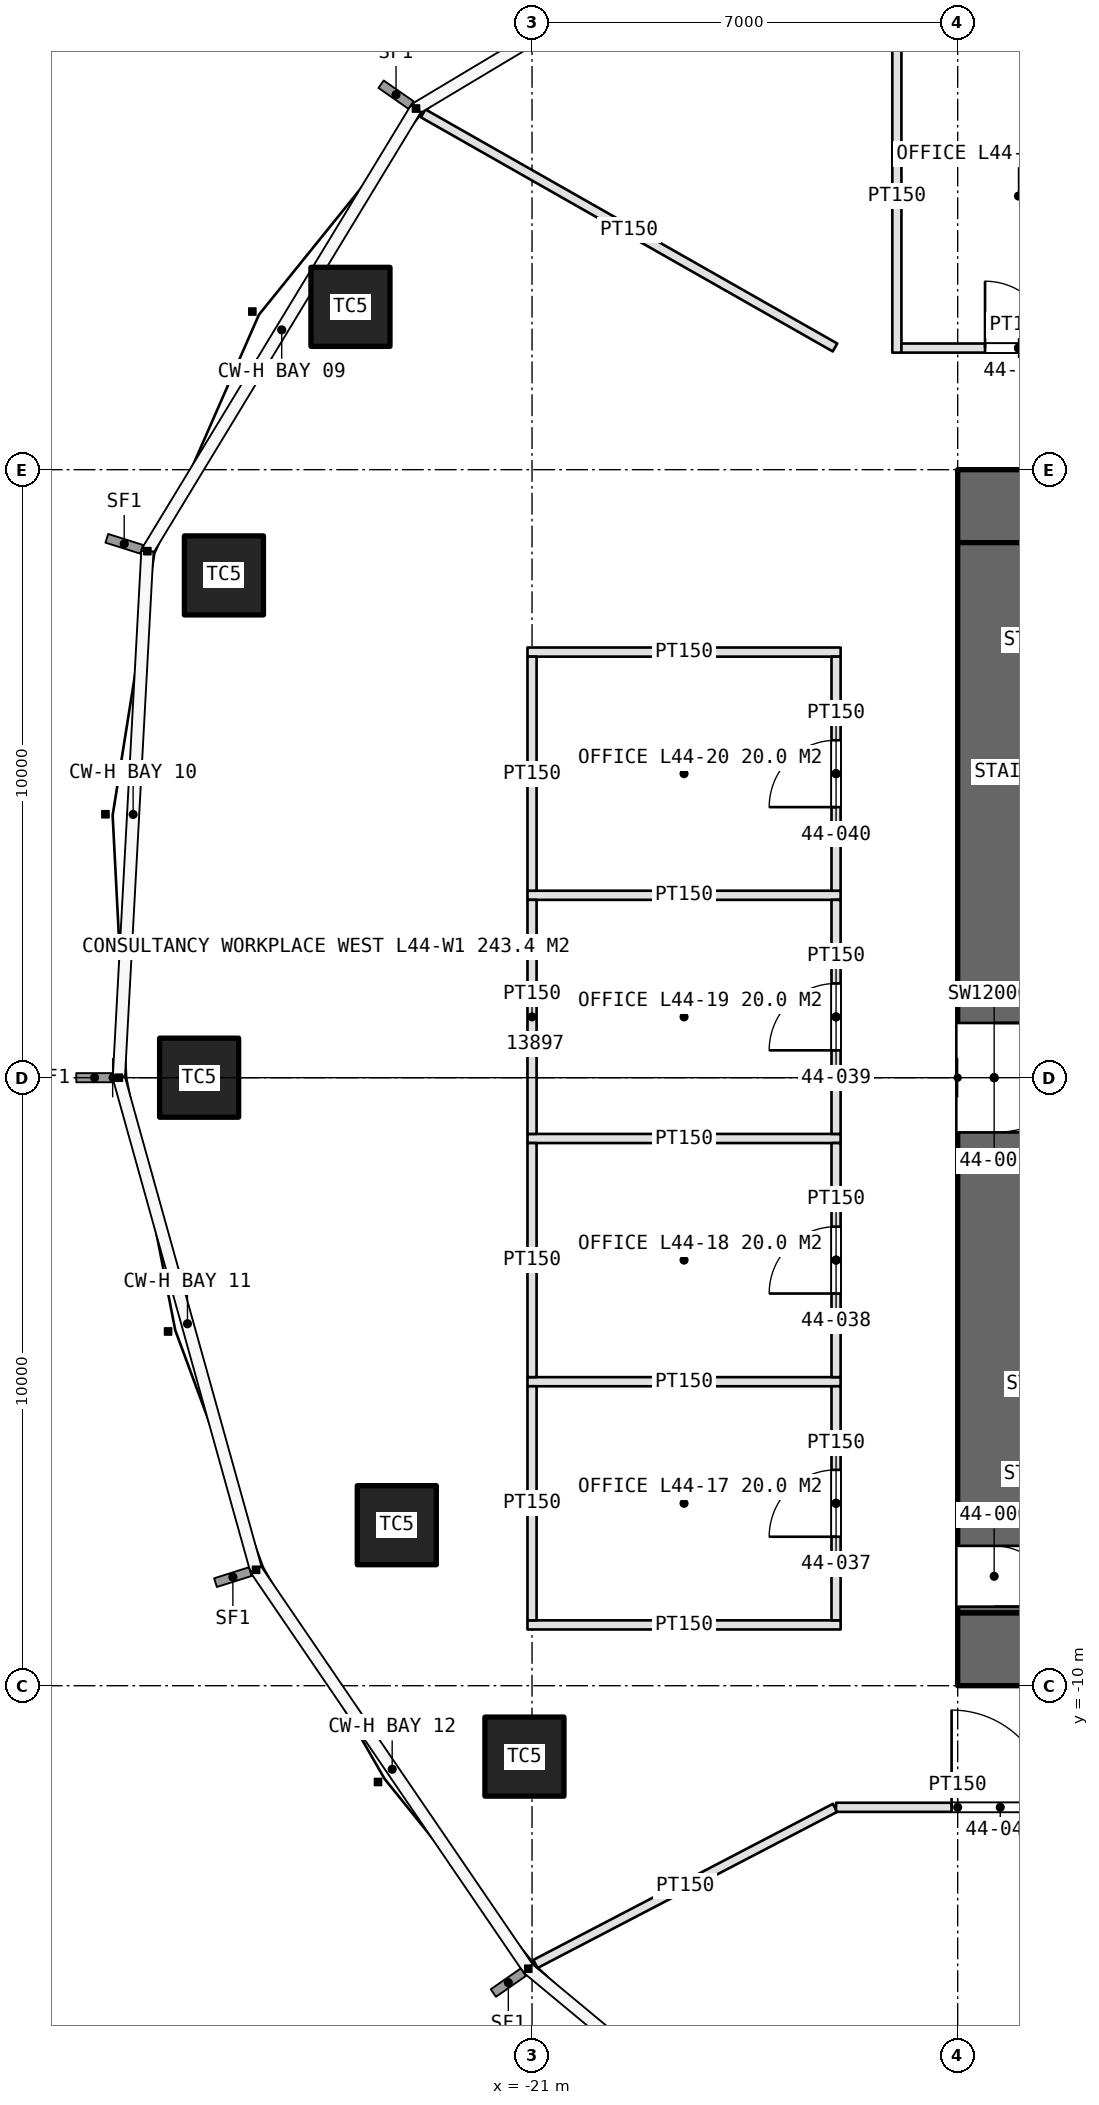
"""IFC4 building model, lengths in metres.
Left out: names, types, materials, properties, quantities, classifications, styles, units other than length and angle.
Written with IfcOpenShell. Run it as: python <this file> out.ifc"""

import sys

from ifc_helpers import new_model, si_unit, direction, frame, frame_2d, origin, origin_2d, place, context, subcontext, project, spatial, rectangle, extrude, element, fill, save


model = new_model("IFC4")
c1 = context("Model", 3, precision=1e-05, world=origin(), true_north=direction((0.0, 1.0)))
c2 = subcontext(c1, "Body", "Model", "MODEL_VIEW")
j1 = project(units=[si_unit("LENGTHUNIT", "METRE"), si_unit("PLANEANGLEUNIT", "RADIAN")], contexts=[c1])
p1 = place(None, origin())
s1 = spatial("IfcSite", under=j1, at=p1, CompositionType="ELEMENT")
p2 = place(p1, origin())
s2 = spatial("IfcBuilding", under=s1, at=p2, CompositionType="ELEMENT")
p3 = place(p2, frame((0.0, 0.0, 203.2)))
s3 = spatial("IfcBuildingStorey", under=s2, at=p3, CompositionType="ELEMENT", Elevation=203.2)
p4 = place(p3, frame((-14.0, -9.4, 0.0), z_axis=(0.0, 0.0, 1.0), x_axis=(1.0, 0.0, 0.0)))
e1 = element("IfcWall", 1, at=p4, inside=s3, PredefinedType="SHEAR", context=c2, shape_type="SweptSolid", body=[
    extrude(rectangle(XDim=28.0, YDim=1.2, at=frame_2d((14.0, 0.0))), origin(), (0.0, 0.0, 1.0), 4.2),
])
p5 = place(p4, frame((22.9, 0.0, 0.0)))
e2 = element("IfcOpeningElement", 2, at=p5, cuts=e1, PredefinedType="OPENING", context=c2, shape_type="SweptSolid", body=[
    extrude(rectangle(XDim=2.2, YDim=2.7, at=frame_2d((1.1, 1.35))), frame((0.0, 0.61, 0.0), z_axis=(0.0, -1.0, 0.0), x_axis=(1.0, 0.0, 0.0)), (0.0, 0.0, 1.0), 1.22),
])
p6 = place(p3, frame((14.0, 9.4, 0.0), z_axis=(0.0, 0.0, 1.0), x_axis=(-1.0, 0.0, 0.0)))
e3 = element("IfcWall", 3, at=p6, inside=s3, PredefinedType="SHEAR", context=c2, shape_type="SweptSolid", body=[
    extrude(rectangle(XDim=28.0, YDim=1.2, at=frame_2d((14.0, 0.0))), origin(), (0.0, 0.0, 1.0), 4.2),
])
p7 = place(p6, frame((24.0, 0.0, 0.0)))
e4 = element("IfcOpeningElement", 4, at=p7, cuts=e3, PredefinedType="OPENING", context=c2, shape_type="SweptSolid", body=[
    extrude(rectangle(XDim=1.0, YDim=2.4, at=frame_2d((0.5, 1.2))), frame((0.0, 0.61, 0.0), z_axis=(0.0, -1.0, 0.0), x_axis=(1.0, 0.0, 0.0)), (0.0, 0.0, 1.0), 1.22),
])
p8 = place(p3, frame((-13.4, 8.8, 0.0), z_axis=(0.0, 0.0, 1.0), x_axis=(0.0, -1.0, 0.0)))
e5 = element("IfcWall", 5, at=p8, inside=s3, PredefinedType="SHEAR", context=c2, shape_type="SweptSolid", body=[
    extrude(rectangle(XDim=17.6, YDim=1.2, at=frame_2d((8.8, 0.0))), origin(), (0.0, 0.0, 1.0), 4.2),
])
p9 = place(p8, frame((7.9, 0.0, 0.0)))
e6 = element("IfcOpeningElement", 6, at=p9, cuts=e5, PredefinedType="OPENING", context=c2, shape_type="SweptSolid", body=[
    extrude(rectangle(XDim=1.8, YDim=2.4, at=frame_2d((0.9, 1.2))), frame((0.0, 0.61, 0.0), z_axis=(0.0, -1.0, 0.0), x_axis=(1.0, 0.0, 0.0)), (0.0, 0.0, 1.0), 1.22),
])
p10 = place(p8, frame((16.5, 0.0, 0.0)))
e7 = element("IfcOpeningElement", 7, at=p10, cuts=e5, PredefinedType="OPENING", context=c2, shape_type="SweptSolid", body=[
    extrude(rectangle(XDim=1.0, YDim=2.4, at=frame_2d((0.5, 1.2))), frame((0.0, 0.61, 0.0), z_axis=(0.0, -1.0, 0.0), x_axis=(1.0, 0.0, 0.0)), (0.0, 0.0, 1.0), 1.22),
])
for number, where, z_axis, x_axis in (
    (8, (-23.986, 12.678, 0.0), (0.0, 0.0, 1.0), (1.0, 0.0, 0.0)),
    (9, (-26.067, 8.261, 0.0), (0.0, 0.0, 1.0), (1.0, 0.0, 0.0)),
    (10, (-26.475, 0.0, 0.0), (0.0, 0.0, 1.0), (1.0, 0.0, 0.0)),
    (11, (-23.224, -7.36, 0.0), (0.0, 0.0, 1.0), (1.0, 0.0, 0.0)),
    (12, (-21.125, -11.166, 0.0), (0.0, 0.0, 1.0), (1.0, 0.0, 0.0)),
):
    element("IfcColumn", number, at=place(p3, frame(where, z_axis=z_axis, x_axis=x_axis)), inside=s3, PredefinedType="COLUMN", context=c2, shape_type="SweptSolid", body=[
        extrude(rectangle(XDim=1.3, YDim=1.3, at=origin_2d()), origin(), (0.0, 0.0, 1.0), 4.2),
    ])
p11 = place(p3, frame((-15.0, 11.925, 0.0), z_axis=(0.0, 0.0, 1.0), x_axis=(0.0, 1.0, 0.0)))
e13 = element("IfcWall", 13, at=p11, inside=s3, PredefinedType="PARTITIONING", context=c2, shape_type="SweptSolid", body=[
    extrude(rectangle(XDim=5.15, YDim=0.15, at=frame_2d((2.575, 0.0))), origin(), (0.0, 0.0, 1.0), 3.0),
])
p12 = place(p3, frame((-14.925, 12.0, 0.0), z_axis=(0.0, 0.0, 1.0), x_axis=(1.0, 0.0, 0.0)))
e14 = element("IfcWall", 14, at=p12, inside=s3, PredefinedType="PARTITIONING", context=c2, shape_type="SweptSolid", body=[
    extrude(rectangle(XDim=3.85, YDim=0.15, at=frame_2d((1.925, 0.0))), origin(), (0.0, 0.0, 1.0), 3.0),
])
p13 = place(p12, frame((1.375, 0.0, 0.0)))
e15 = element("IfcOpeningElement", 15, at=p13, cuts=e14, PredefinedType="OPENING", context=c2, shape_type="SweptSolid", body=[
    extrude(rectangle(XDim=1.1, YDim=2.3, at=frame_2d((0.55, 1.15))), frame((0.0, 0.085, 0.0), z_axis=(0.0, -1.0, 0.0), x_axis=(1.0, 0.0, 0.0)), (0.0, 0.0, 1.0), 0.17),
])
for number, where, z_axis, x_axis in (
    (16, (-15.925, -9.0, 0.0), (0.0, 0.0, 1.0), (-1.0, 0.0, 0.0)),
    (17, (-15.925, -5.0, 0.0), (0.0, 0.0, 1.0), (-1.0, 0.0, 0.0)),
    (18, (-15.925, -1.0, 0.0), (0.0, 0.0, 1.0), (-1.0, 0.0, 0.0)),
    (19, (-15.925, 3.0, 0.0), (0.0, 0.0, 1.0), (-1.0, 0.0, 0.0)),
    (20, (-15.925, 7.0, 0.0), (0.0, 0.0, 1.0), (-1.0, 0.0, 0.0)),
):
    element("IfcWall", number, at=place(p3, frame(where, z_axis=z_axis, x_axis=x_axis)), inside=s3, PredefinedType="PARTITIONING", context=c2, shape_type="SweptSolid", body=[
        extrude(rectangle(XDim=5.15, YDim=0.15, at=frame_2d((2.575, 0.0))), origin(), (0.0, 0.0, 1.0), 3.0),
    ])
p14 = place(p3, frame((-16.0, -8.925, 0.0), z_axis=(0.0, 0.0, 1.0), x_axis=(0.0, 1.0, 0.0)))
e21 = element("IfcWall", 21, at=p14, inside=s3, PredefinedType="PARTITIONING", context=c2, shape_type="SweptSolid", body=[
    extrude(rectangle(XDim=3.85, YDim=0.15, at=frame_2d((1.925, 0.0))), origin(), (0.0, 0.0, 1.0), 3.0),
])
p15 = place(p14, frame((1.375, 0.0, 0.0)))
e22 = element("IfcOpeningElement", 22, at=p15, cuts=e21, PredefinedType="OPENING", context=c2, shape_type="SweptSolid", body=[
    extrude(rectangle(XDim=1.1, YDim=2.3, at=frame_2d((0.55, 1.15))), frame((0.0, 0.085, 0.0), z_axis=(0.0, -1.0, 0.0), x_axis=(1.0, 0.0, 0.0)), (0.0, 0.0, 1.0), 0.17),
])
p16 = place(p3, frame((-21.0, -8.925, 0.0), z_axis=(0.0, 0.0, 1.0), x_axis=(0.0, 1.0, 0.0)))
e23 = element("IfcWall", 23, at=p16, inside=s3, PredefinedType="PARTITIONING", context=c2, shape_type="SweptSolid", body=[
    extrude(rectangle(XDim=3.85, YDim=0.15, at=frame_2d((1.925, 0.0))), origin(), (0.0, 0.0, 1.0), 3.0),
])
p17 = place(p3, frame((-16.0, -4.925, 0.0), z_axis=(0.0, 0.0, 1.0), x_axis=(0.0, 1.0, 0.0)))
e24 = element("IfcWall", 24, at=p17, inside=s3, PredefinedType="PARTITIONING", context=c2, shape_type="SweptSolid", body=[
    extrude(rectangle(XDim=3.85, YDim=0.15, at=frame_2d((1.925, 0.0))), origin(), (0.0, 0.0, 1.0), 3.0),
])
p18 = place(p17, frame((1.375, 0.0, 0.0)))
e25 = element("IfcOpeningElement", 25, at=p18, cuts=e24, PredefinedType="OPENING", context=c2, shape_type="SweptSolid", body=[
    extrude(rectangle(XDim=1.1, YDim=2.3, at=frame_2d((0.55, 1.15))), frame((0.0, 0.085, 0.0), z_axis=(0.0, -1.0, 0.0), x_axis=(1.0, 0.0, 0.0)), (0.0, 0.0, 1.0), 0.17),
])
p19 = place(p3, frame((-21.0, -4.925, 0.0), z_axis=(0.0, 0.0, 1.0), x_axis=(0.0, 1.0, 0.0)))
e26 = element("IfcWall", 26, at=p19, inside=s3, PredefinedType="PARTITIONING", context=c2, shape_type="SweptSolid", body=[
    extrude(rectangle(XDim=3.85, YDim=0.15, at=frame_2d((1.925, 0.0))), origin(), (0.0, 0.0, 1.0), 3.0),
])
p20 = place(p3, frame((-16.0, -0.925, 0.0), z_axis=(0.0, 0.0, 1.0), x_axis=(0.0, 1.0, 0.0)))
e27 = element("IfcWall", 27, at=p20, inside=s3, PredefinedType="PARTITIONING", context=c2, shape_type="SweptSolid", body=[
    extrude(rectangle(XDim=3.85, YDim=0.15, at=frame_2d((1.925, 0.0))), origin(), (0.0, 0.0, 1.0), 3.0),
])
p21 = place(p20, frame((1.375, 0.0, 0.0)))
e28 = element("IfcOpeningElement", 28, at=p21, cuts=e27, PredefinedType="OPENING", context=c2, shape_type="SweptSolid", body=[
    extrude(rectangle(XDim=1.1, YDim=2.3, at=frame_2d((0.55, 1.15))), frame((0.0, 0.085, 0.0), z_axis=(0.0, -1.0, 0.0), x_axis=(1.0, 0.0, 0.0)), (0.0, 0.0, 1.0), 0.17),
])
p22 = place(p3, frame((-21.0, -0.925, 0.0), z_axis=(0.0, 0.0, 1.0), x_axis=(0.0, 1.0, 0.0)))
e29 = element("IfcWall", 29, at=p22, inside=s3, PredefinedType="PARTITIONING", context=c2, shape_type="SweptSolid", body=[
    extrude(rectangle(XDim=3.85, YDim=0.15, at=frame_2d((1.925, 0.0))), origin(), (0.0, 0.0, 1.0), 3.0),
])
p23 = place(p3, frame((-16.0, 3.075, 0.0), z_axis=(0.0, 0.0, 1.0), x_axis=(0.0, 1.0, 0.0)))
e30 = element("IfcWall", 30, at=p23, inside=s3, PredefinedType="PARTITIONING", context=c2, shape_type="SweptSolid", body=[
    extrude(rectangle(XDim=3.85, YDim=0.15, at=frame_2d((1.925, 0.0))), origin(), (0.0, 0.0, 1.0), 3.0),
])
p24 = place(p23, frame((1.375, 0.0, 0.0)))
e31 = element("IfcOpeningElement", 31, at=p24, cuts=e30, PredefinedType="OPENING", context=c2, shape_type="SweptSolid", body=[
    extrude(rectangle(XDim=1.1, YDim=2.3, at=frame_2d((0.55, 1.15))), frame((0.0, 0.085, 0.0), z_axis=(0.0, -1.0, 0.0), x_axis=(1.0, 0.0, 0.0)), (0.0, 0.0, 1.0), 0.17),
])
p25 = place(p3, frame((-21.0, 3.075, 0.0), z_axis=(0.0, 0.0, 1.0), x_axis=(0.0, 1.0, 0.0)))
e32 = element("IfcWall", 32, at=p25, inside=s3, PredefinedType="PARTITIONING", context=c2, shape_type="SweptSolid", body=[
    extrude(rectangle(XDim=3.85, YDim=0.15, at=frame_2d((1.925, 0.0))), origin(), (0.0, 0.0, 1.0), 3.0),
])
p26 = place(p3, frame((-16.018, -12.009, 0.0), z_axis=(0.0, 0.0, 1.0), x_axis=(-0.886831549241, -0.462092851351, 0.0)))
e33 = element("IfcWall", 33, at=p26, inside=s3, PredefinedType="PARTITIONING", context=c2, shape_type="SweptSolid", body=[
    extrude(rectangle(XDim=5.555, YDim=0.15, at=frame_2d((2.778, 0.0))), origin(), (0.0, 0.0, 1.0), 3.0),
])
p27 = place(p3, frame((-16.017, 12.01, 0.0), z_axis=(0.0, 0.0, 1.0), x_axis=(-0.869357432803, 0.494183826151, 0.0)))
e34 = element("IfcWall", 34, at=p27, inside=s3, PredefinedType="PARTITIONING", context=c2, shape_type="SweptSolid", body=[
    extrude(rectangle(XDim=7.791, YDim=0.15, at=frame_2d((3.896, 0.0))), origin(), (0.0, 0.0, 1.0), 3.0),
])
p28 = place(p3, frame((-16.0, -12.0, 0.0), z_axis=(0.0, 0.0, 1.0), x_axis=(1.0, 0.0, 0.0)))
e35 = element("IfcWall", 35, at=p28, inside=s3, PredefinedType="PARTITIONING", context=c2, shape_type="SweptSolid", body=[
    extrude(rectangle(XDim=4.0, YDim=0.15, at=frame_2d((2.0, 0.0))), origin(), (0.0, 0.0, 1.0), 3.0),
])
p29 = place(p28, frame((1.9, 0.0, 0.0)))
e36 = element("IfcOpeningElement", 36, at=p29, cuts=e35, PredefinedType="OPENING", context=c2, shape_type="SweptSolid", body=[
    extrude(rectangle(XDim=1.6, YDim=2.4, at=frame_2d((0.8, 1.2))), frame((0.0, 0.085, 0.0), z_axis=(0.0, -1.0, 0.0), x_axis=(1.0, 0.0, 0.0)), (0.0, 0.0, 1.0), 0.17),
])
p30 = place(p9, origin())
e37 = element("IfcDoor", 37, at=p30, inside=s3, OperationType="DOUBLE_DOOR_SINGLE_SWING", PredefinedType="DOOR", context=c2, shape_type="SweptSolid", body=[
    extrude(rectangle(XDim=1.8, YDim=2.4, at=frame_2d((0.9, 1.2))), frame((0.0, 0.025, 0.0), z_axis=(0.0, -1.0, 0.0), x_axis=(1.0, 0.0, 0.0)), (0.0, 0.0, 1.0), 0.05),
])
fill(e6, e37)
p31 = place(p10, origin())
e38 = element("IfcDoor", 38, at=p31, inside=s3, OperationType="SINGLE_SWING_RIGHT", PredefinedType="DOOR", context=c2, shape_type="SweptSolid", body=[
    extrude(rectangle(XDim=1.0, YDim=2.4, at=frame_2d((0.5, 1.2))), frame((0.0, 0.025, 0.0), z_axis=(0.0, -1.0, 0.0), x_axis=(1.0, 0.0, 0.0)), (0.0, 0.0, 1.0), 0.05),
])
fill(e7, e38)
p32 = place(p13, origin())
e39 = element("IfcDoor", 39, at=p32, inside=s3, OperationType="SINGLE_SWING_LEFT", PredefinedType="DOOR", context=c2, shape_type="SweptSolid", body=[
    extrude(rectangle(XDim=1.1, YDim=2.3, at=frame_2d((0.55, 1.15))), frame((0.0, 0.025, 0.0), z_axis=(0.0, -1.0, 0.0), x_axis=(1.0, 0.0, 0.0)), (0.0, 0.0, 1.0), 0.05),
])
fill(e15, e39)
p33 = place(p15, origin())
e40 = element("IfcDoor", 40, at=p33, inside=s3, OperationType="SINGLE_SWING_LEFT", PredefinedType="DOOR", context=c2, shape_type="SweptSolid", body=[
    extrude(rectangle(XDim=1.1, YDim=2.3, at=frame_2d((0.55, 1.15))), frame((0.0, 0.025, 0.0), z_axis=(0.0, -1.0, 0.0), x_axis=(1.0, 0.0, 0.0)), (0.0, 0.0, 1.0), 0.05),
])
fill(e22, e40)
p34 = place(p18, origin())
e41 = element("IfcDoor", 41, at=p34, inside=s3, OperationType="SINGLE_SWING_LEFT", PredefinedType="DOOR", context=c2, shape_type="SweptSolid", body=[
    extrude(rectangle(XDim=1.1, YDim=2.3, at=frame_2d((0.55, 1.15))), frame((0.0, 0.025, 0.0), z_axis=(0.0, -1.0, 0.0), x_axis=(1.0, 0.0, 0.0)), (0.0, 0.0, 1.0), 0.05),
])
fill(e25, e41)
p35 = place(p21, origin())
e42 = element("IfcDoor", 42, at=p35, inside=s3, OperationType="SINGLE_SWING_LEFT", PredefinedType="DOOR", context=c2, shape_type="SweptSolid", body=[
    extrude(rectangle(XDim=1.1, YDim=2.3, at=frame_2d((0.55, 1.15))), frame((0.0, 0.025, 0.0), z_axis=(0.0, -1.0, 0.0), x_axis=(1.0, 0.0, 0.0)), (0.0, 0.0, 1.0), 0.05),
])
fill(e28, e42)
p36 = place(p24, origin())
e43 = element("IfcDoor", 43, at=p36, inside=s3, OperationType="SINGLE_SWING_LEFT", PredefinedType="DOOR", context=c2, shape_type="SweptSolid", body=[
    extrude(rectangle(XDim=1.1, YDim=2.3, at=frame_2d((0.55, 1.15))), frame((0.0, 0.025, 0.0), z_axis=(0.0, -1.0, 0.0), x_axis=(1.0, 0.0, 0.0)), (0.0, 0.0, 1.0), 0.05),
])
fill(e31, e43)
p37 = place(p29, origin())
e44 = element("IfcDoor", 44, at=p37, inside=s3, OperationType="DOUBLE_DOOR_SINGLE_SWING", PredefinedType="DOOR", context=c2, shape_type="SweptSolid", body=[
    extrude(rectangle(XDim=1.6, YDim=2.4, at=frame_2d((0.8, 1.2))), frame((0.0, 0.025, 0.0), z_axis=(0.0, -1.0, 0.0), x_axis=(1.0, 0.0, 0.0)), (0.0, 0.0, 1.0), 0.05),
])
fill(e36, e44)
save(model, sys.argv[1])
